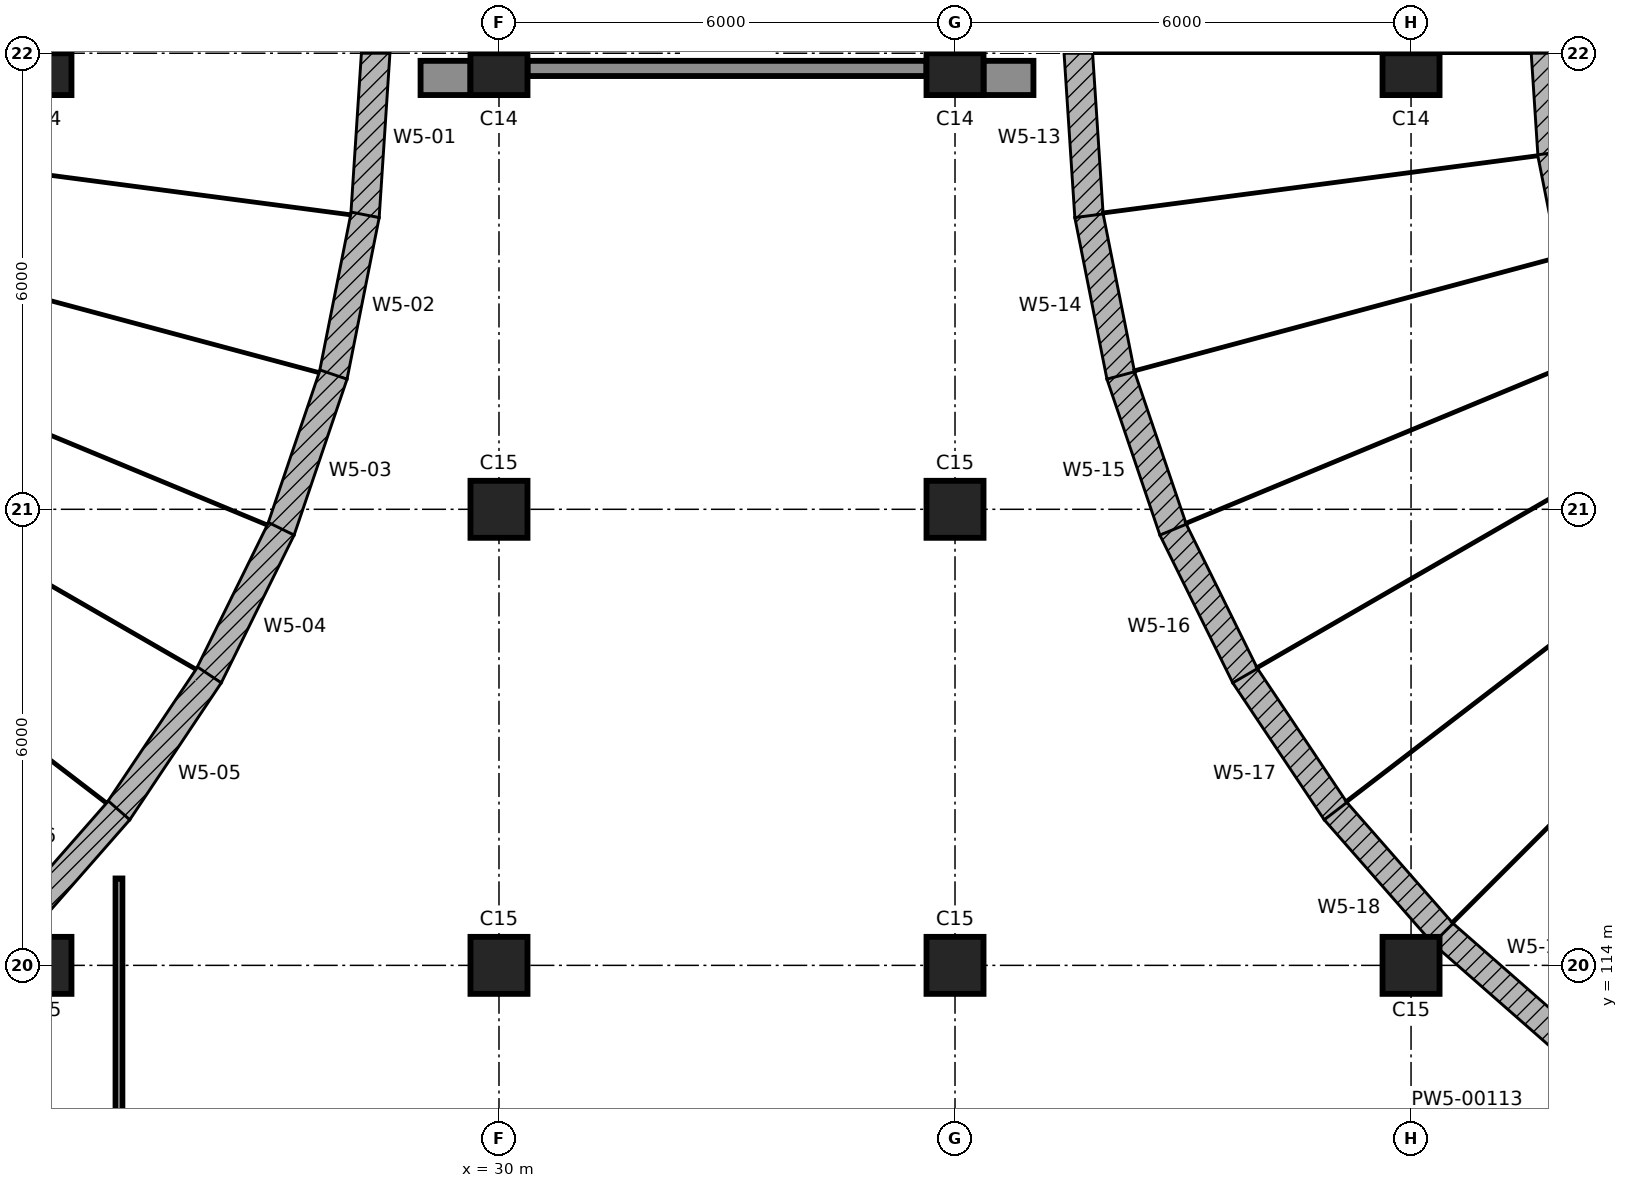
"""IFC4 building model, lengths in metres.
Left out: names, types, materials, properties, quantities, classifications, styles, units other than length and angle.
Written with IfcOpenShell. Run it as: python <this file> out.ifc"""

import sys

from ifc_helpers import new_model, si_unit, direction, frame, frame_2d, origin, origin_2d, place, context, subcontext, project, spatial, polyline, rectangle, outline, extrude, element, fill, save


model = new_model("IFC4")
c1 = context("Model", 3, precision=1e-05, world=origin(), true_north=direction((0.0, 1.0)))
c2 = subcontext(c1, "Body", "Model", "MODEL_VIEW")
j1 = project(units=[si_unit("LENGTHUNIT", "METRE"), si_unit("PLANEANGLEUNIT", "RADIAN")], contexts=[c1])
p1 = place(None, origin())
s1 = spatial("IfcSite", under=j1, at=p1, CompositionType="ELEMENT")
p2 = place(p1, origin())
s2 = spatial("IfcBuilding", under=s1, at=p2, CompositionType="ELEMENT")
p3 = place(p2, origin())
s3 = spatial("IfcBuildingStorey", under=s2, at=p3, CompositionType="ELEMENT", Elevation=0.0)
for number, where, z_axis, x_axis in (
    (1, (24.0, 114.0, -0.3), (0.0, 0.0, 1.0), (1.0, 0.0, 0.0)),
    (2, (30.0, 114.0, -0.3), (0.0, 0.0, 1.0), (1.0, 0.0, 0.0)),
    (3, (36.0, 114.0, -0.3), (0.0, 0.0, 1.0), (1.0, 0.0, 0.0)),
    (4, (42.0, 114.0, -0.3), (0.0, 0.0, 1.0), (1.0, 0.0, 0.0)),
    (5, (30.0, 120.0, -0.3), (0.0, 0.0, 1.0), (1.0, 0.0, 0.0)),
    (6, (36.0, 120.0, -0.3), (0.0, 0.0, 1.0), (1.0, 0.0, 0.0)),
):
    element("IfcColumn", number, at=place(p3, frame(where, z_axis=z_axis, x_axis=x_axis)), inside=s3, PredefinedType="COLUMN", context=c2, shape_type="SweptSolid", body=[
        extrude(rectangle(XDim=0.75, YDim=0.75, at=origin_2d()), origin(), (0.0, 0.0, 1.0), 7.3),
    ])
for number, where, z_axis, x_axis in (
    (7, (24.0, 125.725, -0.3), (0.0, 0.0, 1.0), (1.0, 0.0, 0.0)),
    (8, (30.0, 125.725, -0.3), (0.0, 0.0, 1.0), (1.0, 0.0, 0.0)),
    (9, (36.0, 125.725, -0.3), (0.0, 0.0, 1.0), (1.0, 0.0, 0.0)),
    (10, (42.0, 125.725, -0.3), (0.0, 0.0, 1.0), (1.0, 0.0, 0.0)),
):
    element("IfcColumn", number, at=place(p3, frame(where, z_axis=z_axis, x_axis=x_axis)), inside=s3, PredefinedType="COLUMN", context=c2, shape_type="SweptSolid", body=[
        extrude(rectangle(XDim=0.75, YDim=0.55, at=origin_2d()), origin(), (0.0, 0.0, 1.0), 7.3),
    ])
p4 = place(p3, frame((28.565, 126.0, -0.3), z_axis=(0.748191222673, -0.04900815869, 0.661670684477), x_axis=(-0.065357824287, -0.997861891637, -4.871716e-06)))
e11 = element("IfcWall", 11, at=p4, inside=s3, PredefinedType="SOLIDWALL", context=c2, shape_type="SweptSolid", body=[
    extrude(outline(polyline([(0.0, 0.0), (2.167, -1.388e-17), (1.765, -9.269), (0.402, -9.269), (0.0, 0.0)])), origin(), (4.527e-05, 0.662, 0.75), 0.667),
])
p5 = place(p3, frame((28.424, 123.837, -0.3), z_axis=(0.73538668284, -0.146257877538, 0.661675947847), x_axis=(-0.195050913102, -0.980793118363, -1.6436784e-05)))
e12 = element("IfcWall", 12, at=p5, inside=s3, PredefinedType="SOLIDWALL", context=c2, shape_type="SweptSolid", body=[
    extrude(outline(polyline([(0.0, 0.0), (2.167, -5.551e-17), (1.764, -9.269), (0.402, -9.269), (0.0, 0.0)])), origin(), (3.992e-05, 0.662, 0.75), 0.667),
])
p6 = place(p3, frame((28.001, 121.712, -0.3), z_axis=(0.710000727249, -0.241022741766, 0.661669861228), x_axis=(-0.321485395559, -0.946914536157, 4.0695407e-05)))
e13 = element("IfcWall", 13, at=p6, inside=s3, PredefinedType="SOLIDWALL", context=c2, shape_type="SweptSolid", body=[
    extrude(outline(polyline([(0.0, 0.0), (2.167, -1.11e-16), (1.766, -9.269), (0.403, -9.269), (0.0, 0.0)])), origin(), (-4.89e-05, 0.662, 0.75), 0.667),
])
p7 = place(p3, frame((27.304, 119.66, -0.3), z_axis=(0.67247802402, -0.331623051487, 0.661664158719), x_axis=(-0.442267460576, -0.896883210339, -1.8134674e-05)))
e14 = element("IfcWall", 14, at=p7, inside=s3, PredefinedType="SOLIDWALL", context=c2, shape_type="SweptSolid", body=[
    extrude(outline(polyline([(0.0, 0.0), (2.167, 1.11e-16), (1.764, -9.269), (0.402, -9.269), (0.0, 0.0)])), origin(), (2.383e-05, 0.662, 0.75), 0.667),
])
p8 = place(p3, frame((26.346, 117.717, -0.3), z_axis=(0.623441381436, -0.416561116022, 0.661662814832), x_axis=(-0.555582904203, -0.831461145053, 2.8701608e-05)))
e15 = element("IfcWall", 15, at=p8, inside=s3, PredefinedType="SOLIDWALL", context=c2, shape_type="SweptSolid", body=[
    extrude(outline(polyline([(0.0, 0.0), (2.167, 0.0), (1.765, -9.269), (0.402, -9.269), (0.0, 0.0)])), origin(), (-1.565e-05, 0.662, 0.75), 0.667),
])
p9 = place(p3, frame((25.142, 115.915, -0.3), z_axis=(0.563727278577, -0.494389341921, 0.6616575655), x_axis=(-0.659349875833, -0.751836246232, -9.545532e-06)))
e16 = element("IfcWall", 16, at=p9, inside=s3, PredefinedType="SOLIDWALL", context=c2, shape_type="SweptSolid", body=[
    extrude(outline(polyline([(0.0, 0.0), (2.167, 0.0), (1.765, -9.269), (0.402, -9.269), (0.0, 0.0)])), origin(), (-5.389e-06, 0.662, 0.75), 0.667),
])
p10 = place(p3, frame((23.713, 114.286, -0.3), z_axis=(0.494389341921, -0.563727278577, 0.6616575655), x_axis=(-0.751836246232, -0.659349875833, 9.545532e-06)))
e17 = element("IfcWall", 17, at=p10, inside=s3, PredefinedType="SOLIDWALL", context=c2, shape_type="SweptSolid", body=[
    extrude(outline(polyline([(0.0, 0.0), (2.167, 0.0), (1.765, -9.269), (0.402, -9.269), (0.0, 0.0)])), origin(), (5.389e-06, 0.662, 0.75), 0.667),
])
p11 = place(p3, frame((37.576, 123.837, -0.3), z_axis=(-0.748191222673, -0.04900815869, 0.661670684477), x_axis=(-0.065357824287, 0.997861891637, 4.871716e-06)))
e18 = element("IfcWall", 18, at=p11, inside=s3, PredefinedType="SOLIDWALL", context=c2, shape_type="SweptSolid", body=[
    extrude(outline(polyline([(0.0, 0.0), (2.167, 1.388e-17), (1.765, -9.269), (0.402, -9.269), (0.0, 0.0)])), origin(), (-4.527e-05, 0.662, 0.75), 0.667),
])
p12 = place(p3, frame((37.999, 121.712, -0.3), z_axis=(-0.73538668284, -0.146257877538, 0.661675947847), x_axis=(-0.195050913102, 0.980793118363, 1.6436784e-05)))
e19 = element("IfcWall", 19, at=p12, inside=s3, PredefinedType="SOLIDWALL", context=c2, shape_type="SweptSolid", body=[
    extrude(outline(polyline([(0.0, 0.0), (2.167, 5.551e-17), (1.765, -9.269), (0.402, -9.269), (0.0, 0.0)])), origin(), (-3.992e-05, 0.662, 0.75), 0.667),
])
p13 = place(p3, frame((38.696, 119.66, -0.3), z_axis=(-0.710000727249, -0.241022741766, 0.661669861228), x_axis=(-0.321485395559, 0.946914536157, -4.0695407e-05)))
e20 = element("IfcWall", 20, at=p13, inside=s3, PredefinedType="SOLIDWALL", context=c2, shape_type="SweptSolid", body=[
    extrude(outline(polyline([(0.0, 0.0), (2.167, 1.11e-16), (1.764, -9.269), (0.401, -9.269), (0.0, 0.0)])), origin(), (4.89e-05, 0.662, 0.75), 0.667),
])
p14 = place(p3, frame((39.654, 117.717, -0.3), z_axis=(-0.67247802402, -0.331623051487, 0.661664158719), x_axis=(-0.442267460576, 0.896883210339, 1.8134674e-05)))
e21 = element("IfcWall", 21, at=p14, inside=s3, PredefinedType="SOLIDWALL", context=c2, shape_type="SweptSolid", body=[
    extrude(outline(polyline([(0.0, 0.0), (2.167, -1.11e-16), (1.765, -9.269), (0.402, -9.269), (0.0, 0.0)])), origin(), (-2.383e-05, 0.662, 0.75), 0.667),
])
p15 = place(p3, frame((40.858, 115.915, -0.3), z_axis=(-0.623441381436, -0.416561116022, 0.661662814832), x_axis=(-0.555582904203, 0.831461145053, -2.8701608e-05)))
e22 = element("IfcWall", 22, at=p15, inside=s3, PredefinedType="SOLIDWALL", context=c2, shape_type="SweptSolid", body=[
    extrude(outline(polyline([(0.0, 0.0), (2.167, 0.0), (1.765, -9.269), (0.402, -9.269), (0.0, 0.0)])), origin(), (1.565e-05, 0.662, 0.75), 0.667),
])
p16 = place(p3, frame((42.287, 114.286, -0.3), z_axis=(-0.563727278577, -0.494389341921, 0.6616575655), x_axis=(-0.659349875833, 0.751836246232, 9.545532e-06)))
e23 = element("IfcWall", 23, at=p16, inside=s3, PredefinedType="SOLIDWALL", context=c2, shape_type="SweptSolid", body=[
    extrude(outline(polyline([(0.0, 0.0), (2.167, 0.0), (1.765, -9.269), (0.402, -9.269), (0.0, 0.0)])), origin(), (5.389e-06, 0.662, 0.75), 0.667),
])
p17 = place(p3, frame((43.916, 112.857, -0.3), z_axis=(-0.494389341921, -0.563727278577, 0.6616575655), x_axis=(-0.751836246232, 0.659349875833, -9.545532e-06)))
e24 = element("IfcWall", 24, at=p17, inside=s3, PredefinedType="SOLIDWALL", context=c2, shape_type="SweptSolid", body=[
    extrude(outline(polyline([(0.0, 0.0), (2.167, 0.0), (1.765, -9.269), (0.402, -9.269), (0.0, 0.0)])), origin(), (-5.389e-06, 0.662, 0.75), 0.667),
])
p18 = place(p3, frame((45.717, 111.654, -0.3), z_axis=(-0.416561116022, -0.623441381436, 0.661662814832), x_axis=(-0.831461145053, 0.555582904203, 2.8701608e-05)))
e25 = element("IfcWall", 25, at=p18, inside=s3, PredefinedType="SOLIDWALL", context=c2, shape_type="SweptSolid", body=[
    extrude(outline(polyline([(0.0, 0.0), (2.167, 0.0), (1.765, -9.269), (0.402, -9.269), (0.0, 0.0)])), origin(), (-1.565e-05, 0.662, 0.75), 0.667),
])
p19 = place(p3, frame((28.968, 125.675, 0.0), z_axis=(0.0, 0.0, 1.0), x_axis=(1.0, 0.0, 0.0)))
e26 = element("IfcWall", 26, at=p19, inside=s3, PredefinedType="SOLIDWALL", context=c2, shape_type="SweptSolid", body=[
    extrude(rectangle(XDim=0.657, YDim=0.45, at=frame_2d((0.328, 0.0))), origin(), (0.0, 0.0, 1.0), 6.65),
])
p20 = place(p3, frame((30.375, 125.8, 0.0), z_axis=(0.0, 0.0, 1.0), x_axis=(1.0, 0.0, 0.0)))
e27 = element("IfcWall", 27, at=p20, inside=s3, PredefinedType="SOLIDWALL", context=c2, shape_type="SweptSolid", body=[
    extrude(rectangle(XDim=5.25, YDim=0.2, at=frame_2d((2.625, 0.0))), origin(), (0.0, 0.0, 1.0), 6.75),
])
p21 = place(p20, frame((0.043, 0.0, 0.0)))
e28 = element("IfcOpeningElement", 28, at=p21, cuts=e27, PredefinedType="OPENING", context=c2, shape_type="SweptSolid", body=[
    extrude(rectangle(XDim=1.8, YDim=2.4, at=frame_2d((0.9, 1.2))), frame((0.0, 0.11, 0.0), z_axis=(0.0, -1.0, 0.0), x_axis=(1.0, 0.0, 0.0)), (0.0, 0.0, 1.0), 0.22),
])
p22 = place(p20, frame((3.375, 0.0, 0.0)))
e29 = element("IfcOpeningElement", 29, at=p22, cuts=e27, PredefinedType="OPENING", context=c2, shape_type="SweptSolid", body=[
    extrude(rectangle(XDim=1.8, YDim=2.4, at=frame_2d((0.9, 1.2))), frame((0.0, 0.11, 0.0), z_axis=(0.0, -1.0, 0.0), x_axis=(1.0, 0.0, 0.0)), (0.0, 0.0, 1.0), 0.22),
])
p23 = place(p20, frame((0.043, 0.0, 2.5)))
e30 = element("IfcOpeningElement", 30, at=p23, cuts=e27, PredefinedType="OPENING", context=c2, shape_type="SweptSolid", body=[
    extrude(rectangle(XDim=1.8, YDim=3.9, at=frame_2d((0.9, 1.95))), frame((0.0, 0.11, 0.0), z_axis=(0.0, -1.0, 0.0), x_axis=(1.0, 0.0, 0.0)), (0.0, 0.0, 1.0), 0.22),
])
p24 = place(p20, frame((3.375, 0.0, 2.5)))
e31 = element("IfcOpeningElement", 31, at=p24, cuts=e27, PredefinedType="OPENING", context=c2, shape_type="SweptSolid", body=[
    extrude(rectangle(XDim=1.8, YDim=3.9, at=frame_2d((0.9, 1.95))), frame((0.0, 0.11, 0.0), z_axis=(0.0, -1.0, 0.0), x_axis=(1.0, 0.0, 0.0)), (0.0, 0.0, 1.0), 0.22),
])
p25 = place(p20, frame((1.843, 0.0, 0.1)))
e32 = element("IfcOpeningElement", 32, at=p25, cuts=e27, PredefinedType="OPENING", context=c2, shape_type="SweptSolid", body=[
    extrude(rectangle(XDim=1.532, YDim=6.3, at=frame_2d((0.766, 3.15))), frame((0.0, 0.11, 0.0), z_axis=(0.0, -1.0, 0.0), x_axis=(1.0, 0.0, 0.0)), (0.0, 0.0, 1.0), 0.22),
])
p26 = place(p3, frame((36.375, 125.675, 0.0), z_axis=(0.0, 0.0, 1.0), x_axis=(1.0, 0.0, 0.0)))
e33 = element("IfcWall", 33, at=p26, inside=s3, PredefinedType="SOLIDWALL", context=c2, shape_type="SweptSolid", body=[
    extrude(rectangle(XDim=0.657, YDim=0.45, at=frame_2d((0.328, 0.0))), origin(), (0.0, 0.0, 1.0), 6.65),
])
p27 = place(p3, frame((25.0, 108.0, 0.0), z_axis=(0.0, 0.0, 1.0), x_axis=(0.0, 1.0, 0.0)))
e34 = element("IfcWall", 34, at=p27, inside=s3, PredefinedType="PARTITIONING", context=c2, shape_type="SweptSolid", body=[
    extrude(rectangle(XDim=7.143, YDim=0.09, at=frame_2d((3.572, 0.0))), origin(), (0.0, 0.0, 1.0), 2.75),
])
p28 = place(p21, origin())
e35 = element("IfcDoor", 35, at=p28, inside=s3, OperationType="DOUBLE_DOOR_SINGLE_SWING", PredefinedType="DOOR", context=c2, shape_type="SweptSolid", body=[
    extrude(rectangle(XDim=1.8, YDim=2.4, at=frame_2d((0.9, 1.2))), frame((0.0, 0.025, 0.0), z_axis=(0.0, -1.0, 0.0), x_axis=(1.0, 0.0, 0.0)), (0.0, 0.0, 1.0), 0.05),
])
fill(e28, e35)
p29 = place(p22, origin())
e36 = element("IfcDoor", 36, at=p29, inside=s3, OperationType="DOUBLE_DOOR_SINGLE_SWING", PredefinedType="DOOR", context=c2, shape_type="SweptSolid", body=[
    extrude(rectangle(XDim=1.8, YDim=2.4, at=frame_2d((0.9, 1.2))), frame((0.0, 0.025, 0.0), z_axis=(0.0, -1.0, 0.0), x_axis=(1.0, 0.0, 0.0)), (0.0, 0.0, 1.0), 0.05),
])
fill(e29, e36)
p30 = place(p23, origin())
e37 = element("IfcWindow", 37, at=p30, inside=s3, PartitioningType="SINGLE_PANEL", PredefinedType="WINDOW", context=c2, shape_type="SweptSolid", body=[
    extrude(rectangle(XDim=1.8, YDim=3.9, at=frame_2d((0.9, 1.95))), frame((0.0, 0.03, 0.0), z_axis=(0.0, -1.0, 0.0), x_axis=(1.0, 0.0, 0.0)), (0.0, 0.0, 1.0), 0.06),
])
fill(e30, e37)
p31 = place(p24, origin())
e38 = element("IfcWindow", 38, at=p31, inside=s3, PartitioningType="SINGLE_PANEL", PredefinedType="WINDOW", context=c2, shape_type="SweptSolid", body=[
    extrude(rectangle(XDim=1.8, YDim=3.9, at=frame_2d((0.9, 1.95))), frame((0.0, 0.03, 0.0), z_axis=(0.0, -1.0, 0.0), x_axis=(1.0, 0.0, 0.0)), (0.0, 0.0, 1.0), 0.06),
])
fill(e31, e38)
p32 = place(p25, origin())
e39 = element("IfcWindow", 39, at=p32, inside=s3, PartitioningType="SINGLE_PANEL", PredefinedType="WINDOW", context=c2, shape_type="SweptSolid", body=[
    extrude(rectangle(XDim=1.532, YDim=6.3, at=frame_2d((0.766, 3.15))), frame((0.0, 0.03, 0.0), z_axis=(0.0, -1.0, 0.0), x_axis=(1.0, 0.0, 0.0)), (0.0, 0.0, 1.0), 0.06),
])
fill(e32, e39)
save(model, sys.argv[1])
